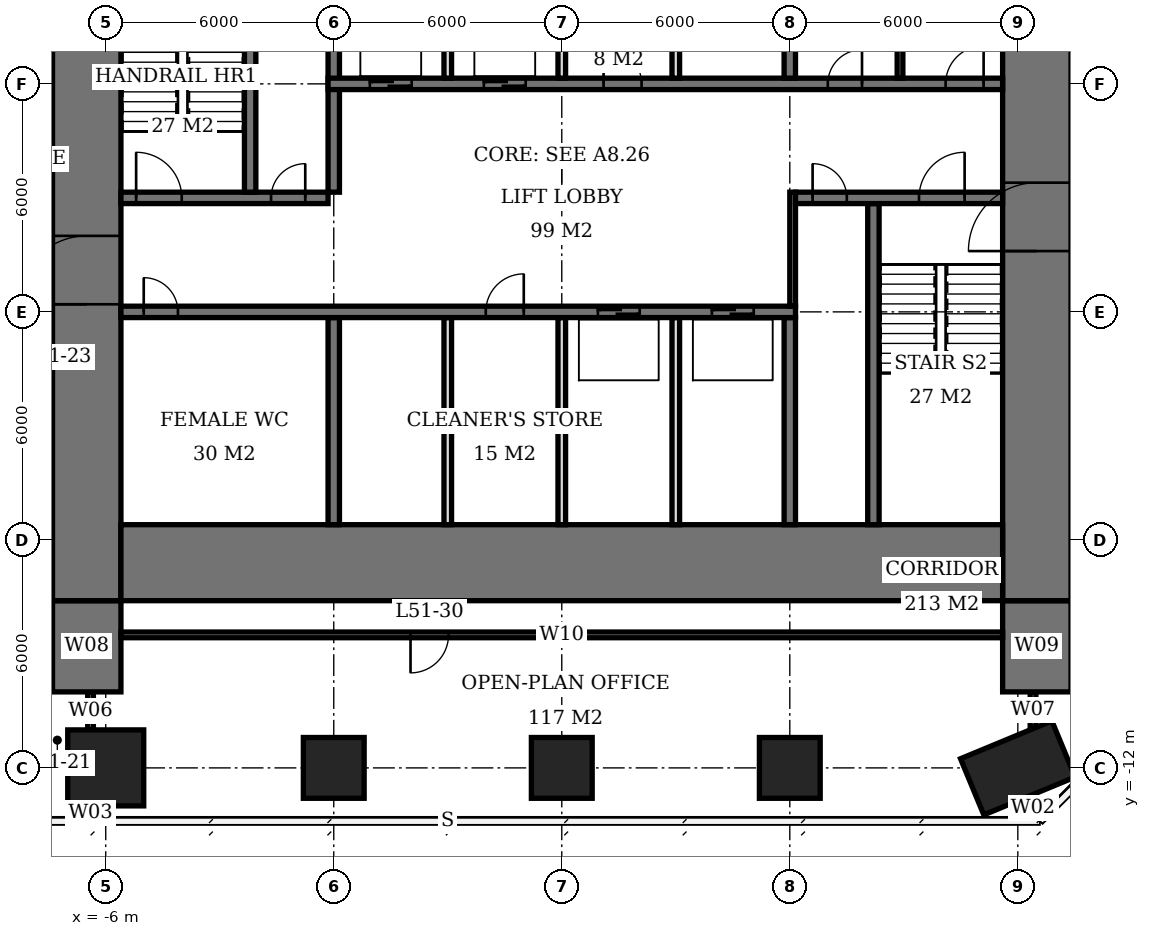
"""IFC4 building model, lengths in metres.
Left out: names, types, materials, properties, quantities, classifications, styles, units other than length and angle.
Written with IfcOpenShell. Run it as: python <this file> out.ifc"""

import sys

from ifc_helpers import new_model, si_unit, direction, frame, frame_2d, origin, origin_2d, place, context, subcontext, project, spatial, rectangle, extrude, element, fill, save


model = new_model("IFC4")
c1 = context("Model", 3, precision=1e-05, world=origin(), true_north=direction((0.0, 1.0)))
c2 = subcontext(c1, "Body", "Model", "MODEL_VIEW")
j1 = project(units=[si_unit("LENGTHUNIT", "METRE"), si_unit("PLANEANGLEUNIT", "RADIAN")], contexts=[c1])
p1 = place(None, origin())
s1 = spatial("IfcSite", under=j1, at=p1, CompositionType="ELEMENT")
p2 = place(p1, origin())
s2 = spatial("IfcBuilding", under=s1, at=p2, CompositionType="ELEMENT")
p3 = place(p2, frame((0.0, 0.0, 208.4)))
s3 = spatial("IfcBuildingStorey", under=s2, at=p3, CompositionType="ELEMENT", Elevation=208.4)
p4 = place(p3, frame((-6.0, -12.0, 0.0), z_axis=(0.0, 0.0, 1.0), x_axis=(1.0, 0.0, 0.0)))
e1 = element("IfcColumn", 1, at=p4, inside=s3, PredefinedType="COLUMN", context=c2, shape_type="SweptSolid", body=[
    extrude(rectangle(XDim=2.0, YDim=2.0, at=origin_2d()), origin(), (0.0, 0.0, 1.0), 3.9),
])
for number, where, z_axis, x_axis in (
    (2, (0.0, -12.0, 0.0), (0.0, 0.0, 1.0), (1.0, 0.0, 0.0)),
    (3, (6.0, -12.0, 0.0), (0.0, 0.0, 1.0), (1.0, 0.0, 0.0)),
    (4, (12.0, -12.0, 0.0), (0.0, 0.0, 1.0), (1.0, 0.0, 0.0)),
):
    element("IfcColumn", number, at=place(p3, frame(where, z_axis=z_axis, x_axis=x_axis)), inside=s3, PredefinedType="COLUMN", context=c2, shape_type="SweptSolid", body=[
        extrude(rectangle(XDim=1.6, YDim=1.6, at=origin_2d()), origin(), (0.0, 0.0, 1.0), 3.9),
    ])
p5 = place(p3, frame((18.0, -12.0, 0.0), z_axis=(0.0, 0.0, 1.0), x_axis=(-0.923879532511, -0.382683432365, 0.0)))
e5 = element("IfcColumn", 5, at=p5, inside=s3, PredefinedType="COLUMN", context=c2, shape_type="SweptSolid", body=[
    extrude(rectangle(XDim=2.6, YDim=1.6, at=origin_2d()), origin(), (0.0, 0.0, 1.0), 3.9),
])
p6 = place(p3, frame((-5.6, -6.6, 0.0), z_axis=(0.0, 0.0, 1.0), x_axis=(1.0, 0.0, 0.0)))
e6 = element("IfcWall", 6, at=p6, inside=s3, PredefinedType="SHEAR", context=c2, shape_type="SweptSolid", body=[
    extrude(rectangle(XDim=23.2, YDim=2.0, at=frame_2d((11.6, 0.0))), origin(), (0.0, 0.0, 1.0), 3.9),
])
p7 = place(p3, frame((-6.5, -7.6, 0.0), z_axis=(0.0, 0.0, 1.0), x_axis=(0.0, 1.0, 0.0)))
e7 = element("IfcWall", 7, at=p7, inside=s3, PredefinedType="SHEAR", context=c2, shape_type="SweptSolid", body=[
    extrude(rectangle(XDim=21.2, YDim=1.8, at=frame_2d((10.6, 0.0))), origin(), (0.0, 0.0, 1.0), 3.9),
])
p8 = place(p7, frame((7.8, 0.0, 0.0)))
e8 = element("IfcOpeningElement", 8, at=p8, cuts=e7, PredefinedType="OPENING", context=c2, shape_type="SweptSolid", body=[
    extrude(rectangle(XDim=1.8, YDim=2.4, at=frame_2d((0.9, 1.2))), frame((0.0, 0.91, 0.0), z_axis=(0.0, -1.0, 0.0), x_axis=(1.0, 0.0, 0.0)), (0.0, 0.0, 1.0), 1.82),
])
p9 = place(p3, frame((18.5, -7.6, 0.0), z_axis=(0.0, 0.0, 1.0), x_axis=(0.0, 1.0, 0.0)))
e9 = element("IfcWall", 9, at=p9, inside=s3, PredefinedType="SHEAR", context=c2, shape_type="SweptSolid", body=[
    extrude(rectangle(XDim=21.2, YDim=1.8, at=frame_2d((10.6, 0.0))), origin(), (0.0, 0.0, 1.0), 3.9),
])
p10 = place(p9, frame((9.2, 0.0, 0.0)))
e10 = element("IfcOpeningElement", 10, at=p10, cuts=e9, PredefinedType="OPENING", context=c2, shape_type="SweptSolid", body=[
    extrude(rectangle(XDim=1.8, YDim=2.4, at=frame_2d((0.9, 1.2))), frame((0.0, 0.91, 0.0), z_axis=(0.0, -1.0, 0.0), x_axis=(1.0, 0.0, 0.0)), (0.0, 0.0, 1.0), 1.82),
])
for number, where, z_axis, x_axis in (
    (11, (-6.5, -10.0, 0.0), (0.0, 0.0, 1.0), (0.0, 1.0, 0.0)),
    (12, (18.5, -10.0, 0.0), (0.0, 0.0, 1.0), (0.0, 1.0, 0.0)),
):
    element("IfcWall", number, at=place(p3, frame(where, z_axis=z_axis, x_axis=x_axis)), inside=s3, PredefinedType="SHEAR", context=c2, shape_type="SweptSolid", body=[
        extrude(rectangle(XDim=2.4, YDim=1.8, at=frame_2d((1.2, 0.0))), origin(), (0.0, 0.0, 1.0), 3.9),
    ])
p11 = place(p3, frame((-5.6, 0.0, 0.0), z_axis=(0.0, 0.0, 1.0), x_axis=(1.0, 0.0, 0.0)))
e13 = element("IfcWall", 13, at=p11, inside=s3, PredefinedType="SHEAR", context=c2, shape_type="SweptSolid", body=[
    extrude(rectangle(XDim=17.75, YDim=0.3, at=frame_2d((8.875, 0.0))), origin(), (0.0, 0.0, 1.0), 3.9),
])
p12 = place(p11, frame((0.6, 0.0, 0.0)))
e14 = element("IfcOpeningElement", 14, at=p12, cuts=e13, PredefinedType="OPENING", context=c2, shape_type="SweptSolid", body=[
    extrude(rectangle(XDim=0.9, YDim=2.1, at=frame_2d((0.45, 1.05))), frame((0.0, 0.16, 0.0), z_axis=(0.0, -1.0, 0.0), x_axis=(1.0, 0.0, 0.0)), (0.0, 0.0, 1.0), 0.32),
])
p13 = place(p11, frame((9.6, 0.0, 0.0)))
e15 = element("IfcOpeningElement", 15, at=p13, cuts=e13, PredefinedType="OPENING", context=c2, shape_type="SweptSolid", body=[
    extrude(rectangle(XDim=1.0, YDim=2.1, at=frame_2d((0.5, 1.05))), frame((0.0, 0.16, 0.0), z_axis=(0.0, -1.0, 0.0), x_axis=(1.0, 0.0, 0.0)), (0.0, 0.0, 1.0), 0.32),
])
p14 = place(p11, frame((12.55, 0.0, 0.0)))
e16 = element("IfcOpeningElement", 16, at=p14, cuts=e13, PredefinedType="OPENING", context=c2, shape_type="SweptSolid", body=[
    extrude(rectangle(XDim=1.1, YDim=2.1, at=frame_2d((0.55, 1.05))), frame((0.0, 0.16, 0.0), z_axis=(0.0, -1.0, 0.0), x_axis=(1.0, 0.0, 0.0)), (0.0, 0.0, 1.0), 0.32),
])
p15 = place(p11, frame((15.55, 0.0, 0.0)))
e17 = element("IfcOpeningElement", 17, at=p15, cuts=e13, PredefinedType="OPENING", context=c2, shape_type="SweptSolid", body=[
    extrude(rectangle(XDim=1.1, YDim=2.1, at=frame_2d((0.55, 1.05))), frame((0.0, 0.16, 0.0), z_axis=(0.0, -1.0, 0.0), x_axis=(1.0, 0.0, 0.0)), (0.0, 0.0, 1.0), 0.32),
])
p16 = place(p3, frame((-5.6, 3.0, 0.0), z_axis=(0.0, 0.0, 1.0), x_axis=(1.0, 0.0, 0.0)))
e18 = element("IfcWall", 18, at=p16, inside=s3, PredefinedType="SHEAR", context=c2, shape_type="SweptSolid", body=[
    extrude(rectangle(XDim=5.45, YDim=0.3, at=frame_2d((2.725, 0.0))), origin(), (0.0, 0.0, 1.0), 3.9),
])
p17 = place(p16, frame((0.4, 0.0, 0.0)))
e19 = element("IfcOpeningElement", 19, at=p17, cuts=e18, PredefinedType="OPENING", context=c2, shape_type="SweptSolid", body=[
    extrude(rectangle(XDim=1.2, YDim=2.1, at=frame_2d((0.6, 1.05))), frame((0.0, 0.16, 0.0), z_axis=(0.0, -1.0, 0.0), x_axis=(1.0, 0.0, 0.0)), (0.0, 0.0, 1.0), 0.32),
])
p18 = place(p16, frame((3.95, 0.0, 0.0)))
e20 = element("IfcOpeningElement", 20, at=p18, cuts=e18, PredefinedType="OPENING", context=c2, shape_type="SweptSolid", body=[
    extrude(rectangle(XDim=0.9, YDim=2.1, at=frame_2d((0.45, 1.05))), frame((0.0, 0.16, 0.0), z_axis=(0.0, -1.0, 0.0), x_axis=(1.0, 0.0, 0.0)), (0.0, 0.0, 1.0), 0.32),
])
p19 = place(p3, frame((12.15, 3.0, 0.0), z_axis=(0.0, 0.0, 1.0), x_axis=(1.0, 0.0, 0.0)))
e21 = element("IfcWall", 21, at=p19, inside=s3, PredefinedType="SHEAR", context=c2, shape_type="SweptSolid", body=[
    extrude(rectangle(XDim=5.45, YDim=0.3, at=frame_2d((2.725, 0.0))), origin(), (0.0, 0.0, 1.0), 3.9),
])
p20 = place(p19, frame((3.25, 0.0, 0.0)))
e22 = element("IfcOpeningElement", 22, at=p20, cuts=e21, PredefinedType="OPENING", context=c2, shape_type="SweptSolid", body=[
    extrude(rectangle(XDim=1.2, YDim=2.1, at=frame_2d((0.6, 1.05))), frame((0.0, 0.16, 0.0), z_axis=(0.0, -1.0, 0.0), x_axis=(1.0, 0.0, 0.0)), (0.0, 0.0, 1.0), 0.32),
])
p21 = place(p19, frame((0.45, 0.0, 0.0)))
e23 = element("IfcOpeningElement", 23, at=p21, cuts=e21, PredefinedType="OPENING", context=c2, shape_type="SweptSolid", body=[
    extrude(rectangle(XDim=0.9, YDim=2.1, at=frame_2d((0.45, 1.05))), frame((0.0, 0.16, 0.0), z_axis=(0.0, -1.0, 0.0), x_axis=(1.0, 0.0, 0.0)), (0.0, 0.0, 1.0), 0.32),
])
p22 = place(p3, frame((-0.15, 6.0, 0.0), z_axis=(0.0, 0.0, 1.0), x_axis=(1.0, 0.0, 0.0)))
e24 = element("IfcWall", 24, at=p22, inside=s3, PredefinedType="SHEAR", context=c2, shape_type="SweptSolid", body=[
    extrude(rectangle(XDim=17.75, YDim=0.3, at=frame_2d((8.875, 0.0))), origin(), (0.0, 0.0, 1.0), 3.9),
])
p23 = place(p22, frame((13.15, 0.0, 0.0)))
e25 = element("IfcOpeningElement", 25, at=p23, cuts=e24, PredefinedType="OPENING", context=c2, shape_type="SweptSolid", body=[
    extrude(rectangle(XDim=0.9, YDim=2.1, at=frame_2d((0.45, 1.05))), frame((0.0, 0.16, 0.0), z_axis=(0.0, -1.0, 0.0), x_axis=(1.0, 0.0, 0.0)), (0.0, 0.0, 1.0), 0.32),
])
p24 = place(p22, frame((16.25, 0.0, 0.0)))
e26 = element("IfcOpeningElement", 26, at=p24, cuts=e24, PredefinedType="OPENING", context=c2, shape_type="SweptSolid", body=[
    extrude(rectangle(XDim=1.0, YDim=2.1, at=frame_2d((0.5, 1.05))), frame((0.0, 0.16, 0.0), z_axis=(0.0, -1.0, 0.0), x_axis=(1.0, 0.0, 0.0)), (0.0, 0.0, 1.0), 0.32),
])
p25 = place(p22, frame((7.25, 0.0, 0.0)))
e27 = element("IfcOpeningElement", 27, at=p25, cuts=e24, PredefinedType="OPENING", context=c2, shape_type="SweptSolid", body=[
    extrude(rectangle(XDim=1.0, YDim=2.1, at=frame_2d((0.5, 1.05))), frame((0.0, 0.16, 0.0), z_axis=(0.0, -1.0, 0.0), x_axis=(1.0, 0.0, 0.0)), (0.0, 0.0, 1.0), 0.32),
])
p26 = place(p22, frame((1.1, 0.0, 0.0)))
e28 = element("IfcOpeningElement", 28, at=p26, cuts=e24, PredefinedType="OPENING", context=c2, shape_type="SweptSolid", body=[
    extrude(rectangle(XDim=1.1, YDim=2.1, at=frame_2d((0.55, 1.05))), frame((0.0, 0.16, 0.0), z_axis=(0.0, -1.0, 0.0), x_axis=(1.0, 0.0, 0.0)), (0.0, 0.0, 1.0), 0.32),
])
p27 = place(p22, frame((4.1, 0.0, 0.0)))
e29 = element("IfcOpeningElement", 29, at=p27, cuts=e24, PredefinedType="OPENING", context=c2, shape_type="SweptSolid", body=[
    extrude(rectangle(XDim=1.1, YDim=2.1, at=frame_2d((0.55, 1.05))), frame((0.0, 0.16, 0.0), z_axis=(0.0, -1.0, 0.0), x_axis=(1.0, 0.0, 0.0)), (0.0, 0.0, 1.0), 0.32),
])
p28 = place(p3, frame((0.0, -5.6, 0.0), z_axis=(0.0, 0.0, 1.0), x_axis=(0.0, 1.0, 0.0)))
e30 = element("IfcWall", 30, at=p28, inside=s3, PredefinedType="SHEAR", context=c2, shape_type="SweptSolid", body=[
    extrude(rectangle(XDim=5.45, YDim=0.3, at=frame_2d((2.725, 0.0))), origin(), (0.0, 0.0, 1.0), 3.9),
])
p29 = place(p3, frame((0.0, 3.15, 0.0), z_axis=(0.0, 0.0, 1.0), x_axis=(0.0, 1.0, 0.0)))
e31 = element("IfcWall", 31, at=p29, inside=s3, PredefinedType="SHEAR", context=c2, shape_type="SweptSolid", body=[
    extrude(rectangle(XDim=8.45, YDim=0.3, at=frame_2d((4.225, 0.0))), origin(), (0.0, 0.0, 1.0), 3.9),
])
for number, where, z_axis, x_axis in (
    (32, (12.0, -5.6, 0.0), (0.0, 0.0, 1.0), (0.0, 1.0, 0.0)),
    (33, (12.0, 6.15, 0.0), (0.0, 0.0, 1.0), (0.0, 1.0, 0.0)),
):
    element("IfcWall", number, at=place(p3, frame(where, z_axis=z_axis, x_axis=x_axis)), inside=s3, PredefinedType="SHEAR", context=c2, shape_type="SweptSolid", body=[
        extrude(rectangle(XDim=5.45, YDim=0.3, at=frame_2d((2.725, 0.0))), origin(), (0.0, 0.0, 1.0), 3.9),
    ])
for number, where, z_axis, x_axis in (
    (34, (-2.2, 3.15, 0.0), (0.0, 0.0, 1.0), (0.0, 1.0, 0.0)),
    (35, (14.2, -5.6, 0.0), (0.0, 0.0, 1.0), (0.0, 1.0, 0.0)),
):
    element("IfcWall", number, at=place(p3, frame(where, z_axis=z_axis, x_axis=x_axis)), inside=s3, PredefinedType="SHEAR", context=c2, shape_type="SweptSolid", body=[
        extrude(rectangle(XDim=8.45, YDim=0.3, at=frame_2d((4.225, 0.0))), origin(), (0.0, 0.0, 1.0), 3.9),
    ])
for number, where, z_axis, x_axis in (
    (36, (3.0, 6.15, 0.0), (0.0, 0.0, 1.0), (0.0, 1.0, 0.0)),
    (37, (6.0, 6.15, 0.0), (0.0, 0.0, 1.0), (0.0, 1.0, 0.0)),
    (38, (9.0, 6.15, 0.0), (0.0, 0.0, 1.0), (0.0, 1.0, 0.0)),
    (39, (3.0, -5.6, 0.0), (0.0, 0.0, 1.0), (0.0, 1.0, 0.0)),
    (40, (6.0, -5.6, 0.0), (0.0, 0.0, 1.0), (0.0, 1.0, 0.0)),
    (41, (9.0, -5.6, 0.0), (0.0, 0.0, 1.0), (0.0, 1.0, 0.0)),
):
    element("IfcWall", number, at=place(p3, frame(where, z_axis=z_axis, x_axis=x_axis)), inside=s3, PredefinedType="SOLIDWALL", context=c2, shape_type="SweptSolid", body=[
        extrude(rectangle(XDim=5.45, YDim=0.2, at=frame_2d((2.725, 0.0))), origin(), (0.0, 0.0, 1.0), 3.9),
    ])
p30 = place(p3, frame((14.9, 6.15, 0.0), z_axis=(0.0, 0.0, 1.0), x_axis=(0.0, 1.0, 0.0)))
e42 = element("IfcWall", 42, at=p30, inside=s3, PredefinedType="PLUMBINGWALL", context=c2, shape_type="SweptSolid", body=[
    extrude(rectangle(XDim=5.45, YDim=0.15, at=frame_2d((2.725, 0.0))), origin(), (0.0, 0.0, 1.0), 3.65),
])
p31 = place(p3, frame((-6.4, -13.35, 0.0), z_axis=(0.0, 0.0, 1.0), x_axis=(0.0, 1.0, 0.0)))
e43 = element("IfcWall", 43, at=p31, inside=s3, PredefinedType="PARTITIONING", context=c2, shape_type="SweptSolid", body=[
    extrude(rectangle(XDim=0.35, YDim=0.15, at=frame_2d((0.175, 0.0))), origin(), (0.0, 0.0, 1.0), 2.65),
])
p32 = place(p3, frame((-6.4, -11.0, 0.0), z_axis=(0.0, 0.0, 1.0), x_axis=(0.0, 1.0, 0.0)))
e44 = element("IfcWall", 44, at=p32, inside=s3, PredefinedType="PARTITIONING", context=c2, shape_type="SweptSolid", body=[
    extrude(rectangle(XDim=1.0, YDim=0.15, at=frame_2d((0.5, 0.0))), origin(), (0.0, 0.0, 1.0), 3.65),
])
p33 = place(p3, frame((17.6, -8.5, 0.0), z_axis=(0.0, 0.0, 1.0), x_axis=(-1.0, 0.0, 0.0)))
e45 = element("IfcWall", 45, at=p33, inside=s3, PredefinedType="PARTITIONING", context=c2, shape_type="SweptSolid", body=[
    extrude(rectangle(XDim=23.2, YDim=0.15, at=frame_2d((11.6, 0.0))), origin(), (0.0, 0.0, 1.0), 3.65),
])
p34 = place(p33, frame((14.58, 0.0, 0.0)))
e46 = element("IfcOpeningElement", 46, at=p34, cuts=e45, PredefinedType="OPENING", context=c2, shape_type="SweptSolid", body=[
    extrude(rectangle(XDim=1.0, YDim=2.1, at=frame_2d((0.5, 1.05))), frame((0.0, 0.085, 0.0), z_axis=(0.0, -1.0, 0.0), x_axis=(1.0, 0.0, 0.0)), (0.0, 0.0, 1.0), 0.17),
])
p35 = place(p3, frame((18.4, -13.4, 0.0), z_axis=(0.0, 0.0, 1.0), x_axis=(0.0, 1.0, 0.0)))
e47 = element("IfcWall", 47, at=p35, inside=s3, PredefinedType="PARTITIONING", context=c2, shape_type="SweptSolid", body=[
    extrude(rectangle(XDim=0.669, YDim=0.15, at=frame_2d((0.334, 0.0))), origin(), (0.0, 0.0, 1.0), 2.65),
])
p36 = place(p3, frame((18.4, -10.937, 0.0), z_axis=(0.0, 0.0, 1.0), x_axis=(0.0, 1.0, 0.0)))
e48 = element("IfcWall", 48, at=p36, inside=s3, PredefinedType="PARTITIONING", context=c2, shape_type="SweptSolid", body=[
    extrude(rectangle(XDim=0.937, YDim=0.15, at=frame_2d((0.469, 0.0))), origin(), (0.0, 0.0, 1.0), 3.65),
])
p37 = place(p3, frame((12.075, 0.15, 0.0), z_axis=(0.0, 0.0, 1.0), x_axis=(0.0, 1.0, 0.0)))
e49 = element("IfcWall", 49, at=p37, inside=s3, PredefinedType="PARTITIONING", context=c2, shape_type="SweptSolid", body=[
    extrude(rectangle(XDim=3.0, YDim=0.15, at=frame_2d((1.5, 0.0))), origin(), (0.0, 0.0, 1.0), 3.65),
])
p38 = place(p8, origin())
e50 = element("IfcDoor", 50, at=p38, inside=s3, OperationType="DOUBLE_DOOR_SINGLE_SWING", PredefinedType="DOOR", context=c2, shape_type="SweptSolid", body=[
    extrude(rectangle(XDim=1.8, YDim=2.4, at=frame_2d((0.9, 1.2))), frame((0.0, 0.025, 0.0), z_axis=(0.0, -1.0, 0.0), x_axis=(1.0, 0.0, 0.0)), (0.0, 0.0, 1.0), 0.05),
])
fill(e8, e50)
p39 = place(p10, origin())
e51 = element("IfcDoor", 51, at=p39, inside=s3, OperationType="DOUBLE_DOOR_SINGLE_SWING", PredefinedType="DOOR", context=c2, shape_type="SweptSolid", body=[
    extrude(rectangle(XDim=1.8, YDim=2.4, at=frame_2d((0.9, 1.2))), frame((0.0, 0.025, 0.0), z_axis=(0.0, -1.0, 0.0), x_axis=(1.0, 0.0, 0.0)), (0.0, 0.0, 1.0), 0.05),
])
fill(e10, e51)
p40 = place(p17, origin())
e52 = element("IfcDoor", 52, at=p40, inside=s3, OperationType="SINGLE_SWING_LEFT", PredefinedType="DOOR", context=c2, shape_type="SweptSolid", body=[
    extrude(rectangle(XDim=1.2, YDim=2.1, at=frame_2d((0.6, 1.05))), frame((0.0, 0.025, 0.0), z_axis=(0.0, -1.0, 0.0), x_axis=(1.0, 0.0, 0.0)), (0.0, 0.0, 1.0), 0.05),
])
fill(e19, e52)
p41 = place(p18, origin())
e53 = element("IfcDoor", 53, at=p41, inside=s3, OperationType="SINGLE_SWING_RIGHT", PredefinedType="DOOR", context=c2, shape_type="SweptSolid", body=[
    extrude(rectangle(XDim=0.9, YDim=2.1, at=frame_2d((0.45, 1.05))), frame((0.0, 0.025, 0.0), z_axis=(0.0, -1.0, 0.0), x_axis=(1.0, 0.0, 0.0)), (0.0, 0.0, 1.0), 0.05),
])
fill(e20, e53)
p42 = place(p20, origin())
e54 = element("IfcDoor", 54, at=p42, inside=s3, OperationType="SINGLE_SWING_RIGHT", PredefinedType="DOOR", context=c2, shape_type="SweptSolid", body=[
    extrude(rectangle(XDim=1.2, YDim=2.1, at=frame_2d((0.6, 1.05))), frame((0.0, 0.025, 0.0), z_axis=(0.0, -1.0, 0.0), x_axis=(1.0, 0.0, 0.0)), (0.0, 0.0, 1.0), 0.05),
])
fill(e22, e54)
p43 = place(p21, origin())
e55 = element("IfcDoor", 55, at=p43, inside=s3, OperationType="SINGLE_SWING_LEFT", PredefinedType="DOOR", context=c2, shape_type="SweptSolid", body=[
    extrude(rectangle(XDim=0.9, YDim=2.1, at=frame_2d((0.45, 1.05))), frame((0.0, 0.025, 0.0), z_axis=(0.0, -1.0, 0.0), x_axis=(1.0, 0.0, 0.0)), (0.0, 0.0, 1.0), 0.05),
])
fill(e23, e55)
p44 = place(p12, origin())
e56 = element("IfcDoor", 56, at=p44, inside=s3, OperationType="SINGLE_SWING_LEFT", PredefinedType="DOOR", context=c2, shape_type="SweptSolid", body=[
    extrude(rectangle(XDim=0.9, YDim=2.1, at=frame_2d((0.45, 1.05))), frame((0.0, 0.025, 0.0), z_axis=(0.0, -1.0, 0.0), x_axis=(1.0, 0.0, 0.0)), (0.0, 0.0, 1.0), 0.05),
])
fill(e14, e56)
p45 = place(p23, origin())
e57 = element("IfcDoor", 57, at=p45, inside=s3, OperationType="SINGLE_SWING_RIGHT", PredefinedType="DOOR", context=c2, shape_type="SweptSolid", body=[
    extrude(rectangle(XDim=0.9, YDim=2.1, at=frame_2d((0.45, 1.05))), frame((0.0, 0.025, 0.0), z_axis=(0.0, -1.0, 0.0), x_axis=(1.0, 0.0, 0.0)), (0.0, 0.0, 1.0), 0.05),
])
fill(e25, e57)
p46 = place(p24, origin())
e58 = element("IfcDoor", 58, at=p46, inside=s3, OperationType="SINGLE_SWING_RIGHT", PredefinedType="DOOR", context=c2, shape_type="SweptSolid", body=[
    extrude(rectangle(XDim=1.0, YDim=2.1, at=frame_2d((0.5, 1.05))), frame((0.0, 0.025, 0.0), z_axis=(0.0, -1.0, 0.0), x_axis=(1.0, 0.0, 0.0)), (0.0, 0.0, 1.0), 0.05),
])
fill(e26, e58)
p47 = place(p25, origin())
e59 = element("IfcDoor", 59, at=p47, inside=s3, OperationType="SINGLE_SWING_LEFT", PredefinedType="DOOR", context=c2, shape_type="SweptSolid", body=[
    extrude(rectangle(XDim=1.0, YDim=2.1, at=frame_2d((0.5, 1.05))), frame((0.0, 0.025, 0.0), z_axis=(0.0, -1.0, 0.0), x_axis=(1.0, 0.0, 0.0)), (0.0, 0.0, 1.0), 0.05),
])
fill(e27, e59)
p48 = place(p13, origin())
e60 = element("IfcDoor", 60, at=p48, inside=s3, OperationType="SINGLE_SWING_RIGHT", PredefinedType="DOOR", context=c2, shape_type="SweptSolid", body=[
    extrude(rectangle(XDim=1.0, YDim=2.1, at=frame_2d((0.5, 1.05))), frame((0.0, 0.025, 0.0), z_axis=(0.0, -1.0, 0.0), x_axis=(1.0, 0.0, 0.0)), (0.0, 0.0, 1.0), 0.05),
])
fill(e15, e60)
p49 = place(p26, origin())
e61 = element("IfcDoor", 61, at=p49, inside=s3, OperationType="DOUBLE_DOOR_SLIDING", PredefinedType="USERDEFINED", context=c2, shape_type="SweptSolid", body=[
    extrude(rectangle(XDim=1.1, YDim=2.1, at=frame_2d((0.55, 1.05))), frame((0.0, 0.025, 0.0), z_axis=(0.0, -1.0, 0.0), x_axis=(1.0, 0.0, 0.0)), (0.0, 0.0, 1.0), 0.05),
])
fill(e28, e61)
p50 = place(p27, origin())
e62 = element("IfcDoor", 62, at=p50, inside=s3, OperationType="DOUBLE_DOOR_SLIDING", PredefinedType="USERDEFINED", context=c2, shape_type="SweptSolid", body=[
    extrude(rectangle(XDim=1.1, YDim=2.1, at=frame_2d((0.55, 1.05))), frame((0.0, 0.025, 0.0), z_axis=(0.0, -1.0, 0.0), x_axis=(1.0, 0.0, 0.0)), (0.0, 0.0, 1.0), 0.05),
])
fill(e29, e62)
p51 = place(p14, origin())
e63 = element("IfcDoor", 63, at=p51, inside=s3, OperationType="DOUBLE_DOOR_SLIDING", PredefinedType="USERDEFINED", context=c2, shape_type="SweptSolid", body=[
    extrude(rectangle(XDim=1.1, YDim=2.1, at=frame_2d((0.55, 1.05))), frame((0.0, 0.025, 0.0), z_axis=(0.0, -1.0, 0.0), x_axis=(1.0, 0.0, 0.0)), (0.0, 0.0, 1.0), 0.05),
])
fill(e16, e63)
p52 = place(p15, origin())
e64 = element("IfcDoor", 64, at=p52, inside=s3, OperationType="DOUBLE_DOOR_SLIDING", PredefinedType="USERDEFINED", context=c2, shape_type="SweptSolid", body=[
    extrude(rectangle(XDim=1.1, YDim=2.1, at=frame_2d((0.55, 1.05))), frame((0.0, 0.025, 0.0), z_axis=(0.0, -1.0, 0.0), x_axis=(1.0, 0.0, 0.0)), (0.0, 0.0, 1.0), 0.05),
])
fill(e17, e64)
p53 = place(p34, origin())
e65 = element("IfcDoor", 65, at=p53, inside=s3, OperationType="SINGLE_SWING_RIGHT", PredefinedType="DOOR", context=c2, shape_type="SweptSolid", body=[
    extrude(rectangle(XDim=1.0, YDim=2.1, at=frame_2d((0.5, 1.05))), frame((0.0, 0.025, 0.0), z_axis=(0.0, -1.0, 0.0), x_axis=(1.0, 0.0, 0.0)), (0.0, 0.0, 1.0), 0.05),
])
fill(e46, e65)
save(model, sys.argv[1])
